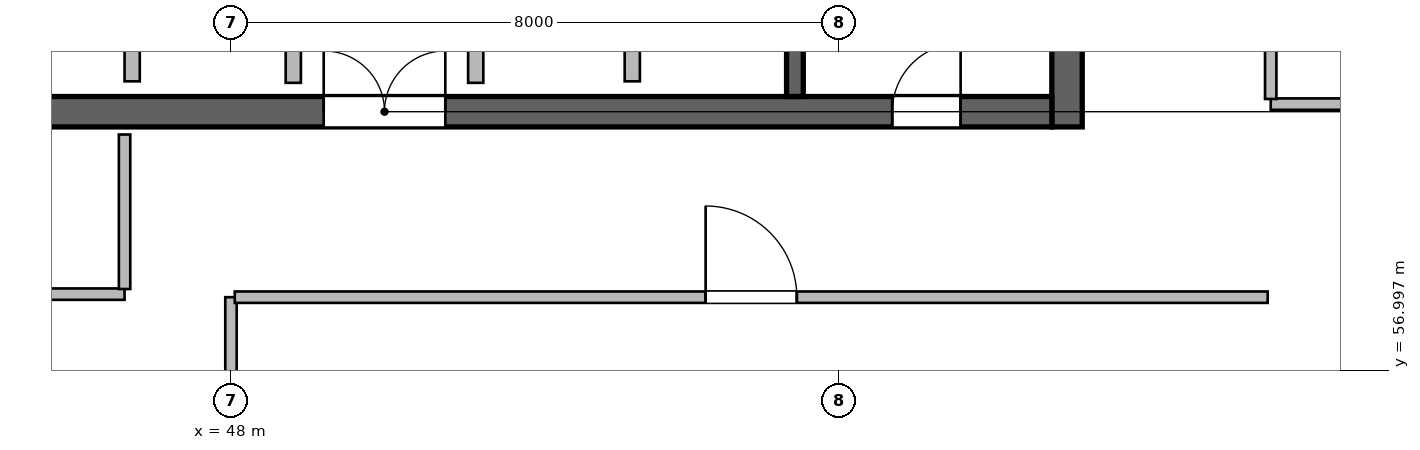
"""IFC4 building model, lengths in metres.
Left out: names, types, materials, properties, quantities, classifications, styles, units other than length and angle.
Written with IfcOpenShell. Run it as: python <this file> out.ifc"""

import sys

from ifc_helpers import new_model, si_unit, direction, frame, frame_2d, origin, place, context, subcontext, project, spatial, rectangle, extrude, source, transform, mapped, element, fill, save


model = new_model("IFC4")
c1 = context("Model", 3, precision=1e-05, world=origin(), true_north=direction((0.0, 1.0)))
c2 = subcontext(c1, "Body", "Model", "MODEL_VIEW")
j1 = project(units=[si_unit("LENGTHUNIT", "METRE"), si_unit("PLANEANGLEUNIT", "RADIAN")], contexts=[c1])
p1 = place(None, origin())
s1 = spatial("IfcSite", under=j1, at=p1, CompositionType="ELEMENT")
p2 = place(p1, origin())
s2 = spatial("IfcBuilding", under=s1, at=p2, CompositionType="ELEMENT")
p3 = place(p2, frame((0.0, 0.0, 312.6)))
s3 = spatial("IfcBuildingStorey", under=s2, at=p3, CompositionType="ELEMENT", Elevation=312.6)
m1 = source(origin(), c2, "Body", "SweptSolid", [
    extrude(rectangle(XDim=12.0, YDim=0.4, at=frame_2d((6.0, 0.0))), origin(), (0.0, 0.0, 1.0), 5.4),
])
p4 = place(p3, frame((59.0, 60.2, 0.0), z_axis=(0.0, 0.0, 1.0), x_axis=(0.0, 1.0, 0.0)))
e1 = element("IfcWall", 1, at=p4, inside=s3, PredefinedType="SHEAR", context=c2, shape_type="MappedRepresentation", body=[
    mapped(m1, transform((0.0, 0.0, 0.0), scale=1.0)),
])
m2 = source(origin(), c2, "Body", "SweptSolid", [
    extrude(rectangle(XDim=21.6, YDim=0.4, at=frame_2d((10.8, 0.0))), origin(), (0.0, 0.0, 1.0), 5.4),
])
p5 = place(p3, frame((37.2, 60.4, 0.0), z_axis=(0.0, 0.0, 1.0), x_axis=(1.0, 0.0, 0.0)))
e2 = element("IfcWall", 2, at=p5, inside=s3, PredefinedType="SHEAR", context=c2, shape_type="MappedRepresentation", body=[
    mapped(m2, transform((0.0, 0.0, 0.0), scale=1.0)),
])
p6 = place(p5, frame((1.1, 0.0, 0.0)))
e3 = element("IfcOpeningElement", 3, at=p6, cuts=e2, PredefinedType="OPENING", context=c2, shape_type="SweptSolid", body=[
    extrude(rectangle(XDim=1.15, YDim=2.15, at=frame_2d((0.575, 1.075))), frame((0.0, 0.21, 0.0), z_axis=(0.0, -1.0, 0.0), x_axis=(1.0, 0.0, 0.0)), (0.0, 0.0, 1.0), 0.42),
])
p7 = place(p5, frame((19.5, 0.0, 0.0)))
e4 = element("IfcOpeningElement", 4, at=p7, cuts=e2, PredefinedType="OPENING", context=c2, shape_type="SweptSolid", body=[
    extrude(rectangle(XDim=0.9, YDim=2.1, at=frame_2d((0.45, 1.05))), frame((0.0, 0.21, 0.0), z_axis=(0.0, -1.0, 0.0), x_axis=(1.0, 0.0, 0.0)), (0.0, 0.0, 1.0), 0.42),
])
p8 = place(p5, frame((12.02, 0.0, 0.0)))
e5 = element("IfcOpeningElement", 5, at=p8, cuts=e2, PredefinedType="OPENING", context=c2, shape_type="SweptSolid", body=[
    extrude(rectangle(XDim=1.6, YDim=2.15, at=frame_2d((0.8, 1.075))), frame((0.0, 0.21, 0.0), z_axis=(0.0, -1.0, 0.0), x_axis=(1.0, 0.0, 0.0)), (0.0, 0.0, 1.0), 0.42),
])
m3 = source(origin(), c2, "Body", "SweptSolid", [
    extrude(rectangle(XDim=11.2, YDim=0.22, at=frame_2d((5.6, 0.0))), origin(), (0.0, 0.0, 1.0), 5.4),
])
p9 = place(p3, frame((55.42, 60.6, 0.0), z_axis=(0.0, 0.0, 1.0), x_axis=(0.0, 1.0, 0.0)))
e6 = element("IfcWall", 6, at=p9, inside=s3, PredefinedType="SHEAR", context=c2, shape_type="MappedRepresentation", body=[
    mapped(m3, transform((0.0, 0.0, 0.0), scale=1.0)),
])
p10 = place(p9, frame((9.645, 0.0, 0.0)))
e7 = element("IfcOpeningElement", 7, at=p10, cuts=e6, PredefinedType="OPENING", context=c2, shape_type="SweptSolid", body=[
    extrude(rectangle(XDim=1.15, YDim=2.15, at=frame_2d((0.575, 1.075))), frame((0.0, 0.12, 0.0), z_axis=(0.0, -1.0, 0.0), x_axis=(1.0, 0.0, 0.0)), (0.0, 0.0, 1.0), 0.24),
])
m4 = source(origin(), c2, "Body", "SweptSolid", [
    extrude(rectangle(XDim=2.24, YDim=0.2, at=frame_2d((1.12, 0.0))), origin(), (0.0, 0.0, 1.0), 5.12),
])
for number, where, z_axis, x_axis in (
    (8, (48.82, 60.78, 0.0), (0.0, 0.0, 1.0), (0.0, 1.0, 0.0)),
    (9, (51.22, 60.78, 0.0), (0.0, 0.0, 1.0), (0.0, 1.0, 0.0)),
):
    element("IfcWall", number, at=place(p3, frame(where, z_axis=z_axis, x_axis=x_axis)), inside=s3, PredefinedType="SOLIDWALL", context=c2, shape_type="MappedRepresentation", body=[
        mapped(m4, transform((0.0, 0.0, 0.0), scale=1.0)),
    ])
m5 = source(origin(), c2, "Body", "SweptSolid", [
    extrude(rectangle(XDim=2.2, YDim=0.2, at=frame_2d((1.1, 0.0))), origin(), (0.0, 0.0, 1.0), 5.12),
])
for number, where, z_axis, x_axis in (
    (10, (46.7, 60.8, 0.0), (0.0, 0.0, 1.0), (0.0, 1.0, 0.0)),
    (11, (53.28, 60.8, 0.0), (0.0, 0.0, 1.0), (0.0, 1.0, 0.0)),
):
    element("IfcWall", number, at=place(p3, frame(where, z_axis=z_axis, x_axis=x_axis)), inside=s3, PredefinedType="SOLIDWALL", context=c2, shape_type="MappedRepresentation", body=[
        mapped(m5, transform((0.0, 0.0, 0.0), scale=1.0)),
    ])
m6 = source(origin(), c2, "Body", "SweptSolid", [
    extrude(rectangle(XDim=5.4, YDim=0.15, at=frame_2d((2.7, 0.0))), origin(), (0.0, 0.0, 1.0), 5.12),
])
p11 = place(p3, frame((41.2, 58.0, 0.0), z_axis=(0.0, 0.0, 1.0), x_axis=(1.0, 0.0, 0.0)))
e12 = element("IfcWall", 12, at=p11, inside=s3, PredefinedType="PARTITIONING", context=c2, shape_type="MappedRepresentation", body=[
    mapped(m6, transform((0.0, 0.0, 0.0), scale=1.0)),
])
p12 = place(p11, frame((2.1, 0.0, 0.0)))
e13 = element("IfcOpeningElement", 13, at=p12, cuts=e12, PredefinedType="OPENING", context=c2, shape_type="SweptSolid", body=[
    extrude(rectangle(XDim=1.2, YDim=2.15, at=frame_2d((0.6, 1.075))), frame((0.0, 0.085, 0.0), z_axis=(0.0, -1.0, 0.0), x_axis=(1.0, 0.0, 0.0)), (0.0, 0.0, 1.0), 0.17),
])
m7 = source(origin(), c2, "Body", "SweptSolid", [
    extrude(rectangle(XDim=2.033, YDim=0.15, at=frame_2d((1.016, 0.0))), origin(), (0.0, 0.0, 1.0), 5.12),
])
p13 = place(p3, frame((46.6, 58.067, 0.0), z_axis=(0.0, 0.0, 1.0), x_axis=(0.0, 1.0, 0.0)))
e14 = element("IfcWall", 14, at=p13, inside=s3, PredefinedType="PARTITIONING", context=c2, shape_type="MappedRepresentation", body=[
    mapped(m7, transform((0.0, 0.0, 0.0), scale=1.0)),
])
m8 = source(origin(), c2, "Body", "SweptSolid", [
    extrude(rectangle(XDim=3.92, YDim=0.15, at=frame_2d((1.96, 0.0))), origin(), (0.0, 0.0, 1.0), 5.12),
])
p14 = place(p3, frame((61.68, 60.5, 0.0), z_axis=(0.0, 0.0, 1.0), x_axis=(1.0, 0.0, 0.0)))
e15 = element("IfcWall", 15, at=p14, inside=s3, PredefinedType="PARTITIONING", context=c2, shape_type="MappedRepresentation", body=[
    mapped(m8, transform((0.0, 0.0, 0.0), scale=1.0)),
])
m9 = source(origin(), c2, "Body", "SweptSolid", [
    extrude(rectangle(XDim=4.865, YDim=0.15, at=frame_2d((2.433, 0.0))), origin(), (0.0, 0.0, 1.0), 5.12),
])
p15 = place(p3, frame((61.68, 60.567, 0.0), z_axis=(0.0, 0.0, 1.0), x_axis=(0.0, 1.0, 0.0)))
e16 = element("IfcWall", 16, at=p15, inside=s3, PredefinedType="PARTITIONING", context=c2, shape_type="MappedRepresentation", body=[
    mapped(m9, transform((0.0, 0.0, 0.0), scale=1.0)),
])
p16 = place(p15, frame((1.883, 0.0, 0.0)))
e17 = element("IfcOpeningElement", 17, at=p16, cuts=e16, PredefinedType="OPENING", context=c2, shape_type="SweptSolid", body=[
    extrude(rectangle(XDim=1.1, YDim=2.15, at=frame_2d((0.55, 1.075))), frame((0.0, 0.085, 0.0), z_axis=(0.0, -1.0, 0.0), x_axis=(1.0, 0.0, 0.0)), (0.0, 0.0, 1.0), 0.17),
])
m10 = source(origin(), c2, "Body", "SweptSolid", [
    extrude(rectangle(XDim=3.141, YDim=0.15, at=frame_2d((1.571, 0.0))), origin(), (0.0, 0.0, 1.0), 4.794),
])
p17 = place(p3, frame((48.0, 54.819, 0.0), z_axis=(0.0, 0.0, 1.0), x_axis=(0.0, 1.0, 0.0)))
e18 = element("IfcWall", 18, at=p17, inside=s3, PredefinedType="PARTITIONING", context=c2, shape_type="MappedRepresentation", body=[
    mapped(m10, transform((0.0, 0.0, 0.0), scale=1.0)),
])
m11 = source(origin(), c2, "Body", "SweptSolid", [
    extrude(rectangle(XDim=13.59, YDim=0.15, at=frame_2d((6.795, 0.0))), origin(), (0.0, 0.0, 1.0), 4.853),
])
p18 = place(p3, frame((48.05, 57.96, 0.0), z_axis=(0.0, 0.0, 1.0), x_axis=(1.0, 0.0, 0.0)))
e19 = element("IfcWall", 19, at=p18, inside=s3, PredefinedType="PARTITIONING", context=c2, shape_type="MappedRepresentation", body=[
    mapped(m11, transform((0.0, 0.0, 0.0), scale=1.0)),
])
p19 = place(p18, frame((6.195, 0.0, 0.0)))
e20 = element("IfcOpeningElement", 20, at=p19, cuts=e19, PredefinedType="OPENING", context=c2, shape_type="SweptSolid", body=[
    extrude(rectangle(XDim=1.2, YDim=2.15, at=frame_2d((0.6, 1.075))), frame((0.0, 0.085, 0.0), z_axis=(0.0, -1.0, 0.0), x_axis=(1.0, 0.0, 0.0)), (0.0, 0.0, 1.0), 0.17),
])
m12 = source(origin(), c2, "Body", "SweptSolid", [
    extrude(rectangle(XDim=0.9, YDim=2.1, at=frame_2d((0.45, 1.05))), frame((0.0, 0.025, 0.0), z_axis=(0.0, -1.0, 0.0), x_axis=(1.0, 0.0, 0.0)), (0.0, 0.0, 1.0), 0.05),
])
p20 = place(p7, origin())
e21 = element("IfcDoor", 21, at=p20, inside=s3, OperationType="SINGLE_SWING_RIGHT", PredefinedType="DOOR", context=c2, shape_type="MappedRepresentation", body=[
    mapped(m12, transform((0.0, 0.0, 0.0), scale=1.0)),
])
fill(e4, e21)
m13 = source(origin(), c2, "Body", "SweptSolid", [
    extrude(rectangle(XDim=1.6, YDim=2.15, at=frame_2d((0.8, 1.075))), frame((0.0, 0.025, 0.0), z_axis=(0.0, -1.0, 0.0), x_axis=(1.0, 0.0, 0.0)), (0.0, 0.0, 1.0), 0.05),
])
p21 = place(p8, origin())
e22 = element("IfcDoor", 22, at=p21, inside=s3, OperationType="DOUBLE_DOOR_SINGLE_SWING", PredefinedType="DOOR", context=c2, shape_type="MappedRepresentation", body=[
    mapped(m13, transform((0.0, 0.0, 0.0), scale=1.0)),
])
fill(e5, e22)
m14 = source(origin(), c2, "Body", "SweptSolid", [
    extrude(rectangle(XDim=1.2, YDim=2.15, at=frame_2d((0.6, 1.075))), frame((0.0, 0.025, 0.0), z_axis=(0.0, -1.0, 0.0), x_axis=(1.0, 0.0, 0.0)), (0.0, 0.0, 1.0), 0.05),
])
p22 = place(p19, origin())
e23 = element("IfcDoor", 23, at=p22, inside=s3, OperationType="SINGLE_SWING_LEFT", PredefinedType="DOOR", context=c2, shape_type="MappedRepresentation", body=[
    mapped(m14, transform((0.0, 0.0, 0.0), scale=1.0)),
])
fill(e20, e23)
save(model, sys.argv[1])
